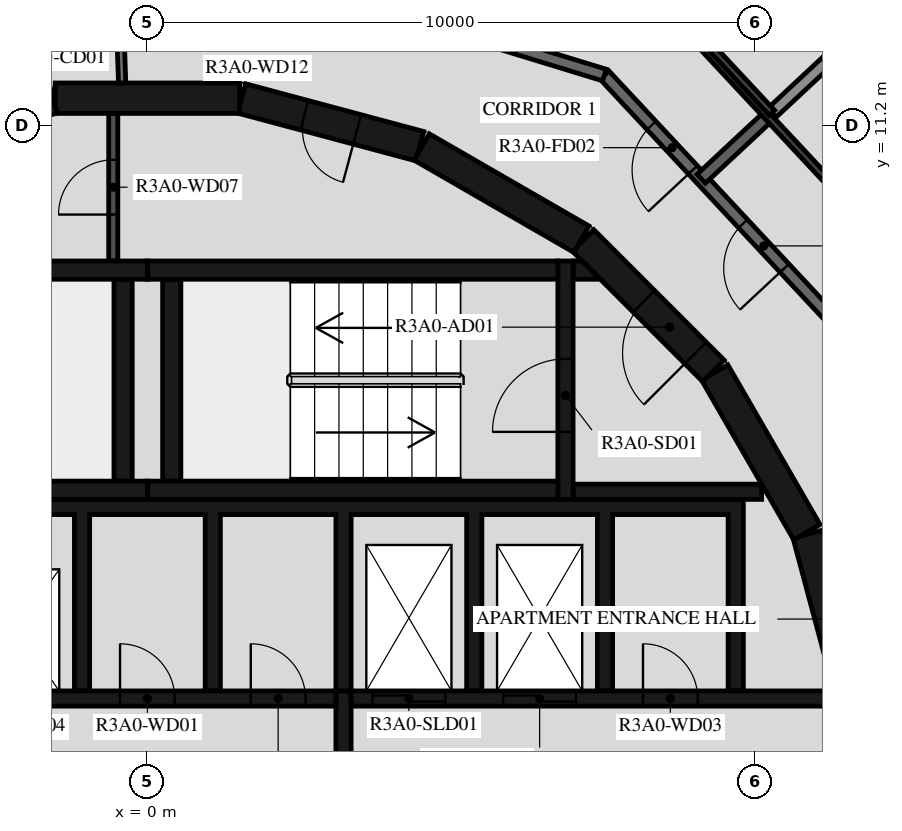
"""IFC4 building model, lengths in metres.
Left out: names, types, materials, properties, quantities, classifications, styles, units other than length and angle.
Written with IfcOpenShell. Run it as: python <this file> out.ifc"""

import sys

from ifc_helpers import new_model, si_unit, direction, frame, frame_2d, origin, place, context, subcontext, project, spatial, polyline, rectangle, outline, extrude, element, fill, save


model = new_model("IFC4")
c1 = context("Model", 3, precision=1e-05, world=origin(), true_north=direction((0.0, 1.0)))
c2 = subcontext(c1, "Body", "Model", "MODEL_VIEW")
j1 = project(units=[si_unit("LENGTHUNIT", "METRE"), si_unit("PLANEANGLEUNIT", "RADIAN")], contexts=[c1])
p1 = place(None, origin())
s1 = spatial("IfcSite", under=j1, at=p1, CompositionType="ELEMENT")
p2 = place(p1, origin())
s2 = spatial("IfcBuilding", under=s1, at=p2, CompositionType="ELEMENT")
p3 = place(p2, frame((0.0, 0.0, 113.4)))
s3 = spatial("IfcBuildingStorey", under=s2, at=p3, CompositionType="ELEMENT", Elevation=113.4)
p4 = place(p3, frame((5.146, 28.027, 0.03), z_axis=(0.0, 0.0, 1.0), x_axis=(0.595048436217, -0.803689839774, 0.0)))
e1 = element("IfcWall", 1, at=p4, inside=s3, PredefinedType="PARAPET", context=c2, shape_type="SweptSolid", body=[
    extrude(rectangle(XDim=35.306, YDim=0.2, at=frame_2d((17.653, 0.0))), origin(), (0.0, 0.0, 1.0), 1.5),
])
for number, where, z_axis, x_axis in (
    (2, (11.643, 1.55, 0.0), (0.0, 0.0, 1.0), (-0.259, 0.966, 0.0)),
    (3, (10.845, 4.51, 0.0), (0.0, 0.0, 1.0), (-0.5, 0.866, 0.0)),
):
    element("IfcWall", number, at=place(p3, frame(where, z_axis=z_axis, x_axis=x_axis)), inside=s3, PredefinedType="SHEAR", context=c2, shape_type="SweptSolid", body=[
        extrude(rectangle(XDim=3.033, YDim=0.5, at=frame_2d((1.516, 0.0))), origin(), (0.0, 0.0, 1.0), 3.12),
    ])
p5 = place(p3, frame((9.308, 7.164, 0.0), z_axis=(0.0, 0.0, 1.0), x_axis=(-0.707106781187, 0.707106781187, 0.0)))
e4 = element("IfcWall", 4, at=p5, inside=s3, PredefinedType="SHEAR", context=c2, shape_type="SweptSolid", body=[
    extrude(rectangle(XDim=3.032, YDim=0.5, at=frame_2d((1.516, 0.0))), origin(), (0.0, 0.0, 1.0), 3.12),
])
p6 = place(p5, frame((0.416, 0.0, 0.0)))
e5 = element("IfcOpeningElement", 5, at=p6, cuts=e4, PredefinedType="OPENING", context=c2, shape_type="SweptSolid", body=[
    extrude(rectangle(XDim=1.2, YDim=2.1, at=frame_2d((0.6, 1.05))), frame((0.0, 0.26, 0.0), z_axis=(0.0, -1.0, 0.0), x_axis=(1.0, 0.0, 0.0)), (0.0, 0.0, 1.0), 0.52),
])
p7 = place(p3, frame((7.137, 9.329, 0.0), z_axis=(0.0, 0.0, 1.0), x_axis=(-0.865975092491, 0.500087131594, 0.0)))
e6 = element("IfcWall", 6, at=p7, inside=s3, PredefinedType="SHEAR", context=c2, shape_type="SweptSolid", body=[
    extrude(rectangle(XDim=3.033, YDim=0.5, at=frame_2d((1.516, 0.0))), origin(), (0.0, 0.0, 1.0), 3.12),
])
p8 = place(p3, frame((4.479, 10.858, 0.0), z_axis=(0.0, 0.0, 1.0), x_axis=(-0.965948410781, 0.258734743916, 0.0)))
e7 = element("IfcWall", 7, at=p8, inside=s3, PredefinedType="SHEAR", context=c2, shape_type="SweptSolid", body=[
    extrude(rectangle(XDim=3.033, YDim=0.5, at=frame_2d((1.516, 0.0))), origin(), (0.0, 0.0, 1.0), 3.12),
])
p9 = place(p8, frame((1.066, 0.0, 0.0)))
e8 = element("IfcOpeningElement", 8, at=p9, cuts=e7, PredefinedType="OPENING", context=c2, shape_type="SweptSolid", body=[
    extrude(rectangle(XDim=0.9, YDim=2.1, at=frame_2d((0.45, 1.05))), frame((0.0, 0.26, 0.0), z_axis=(0.0, -1.0, 0.0), x_axis=(1.0, 0.0, 0.0)), (0.0, 0.0, 1.0), 0.52),
])
for number, where, z_axis, x_axis in (
    (9, (1.516, 11.647, 0.0), (0.0, 0.0, 1.0), (-1.0, 0.0, 0.0)),
    (10, (-1.55, 11.643, 0.0), (0.0, 0.0, 1.0), (-0.966, -0.259, 0.0)),
):
    element("IfcWall", number, at=place(p3, frame(where, z_axis=z_axis, x_axis=x_axis)), inside=s3, PredefinedType="SHEAR", context=c2, shape_type="SweptSolid", body=[
        extrude(rectangle(XDim=3.033, YDim=0.5, at=frame_2d((1.516, 0.0))), origin(), (0.0, 0.0, 1.0), 3.12),
    ])
for number, where, z_axis, x_axis in (
    (11, (0.0, 5.2, 0.0), (0.0, 0.0, 1.0), (1.0, 0.0, 0.0)),
    (12, (0.0, 8.82, 0.0), (0.0, 0.0, 1.0), (1.0, 0.0, 0.0)),
):
    element("IfcWall", number, at=place(p3, frame(where, z_axis=z_axis, x_axis=x_axis)), inside=s3, PredefinedType="SHEAR", context=c2, shape_type="SweptSolid", body=[
        extrude(rectangle(XDim=6.75, YDim=0.3, at=frame_2d((3.375, 0.0))), origin(), (0.0, 0.0, 1.0), 3.12),
    ])
p10 = place(p3, frame((0.4, 5.35, 0.0), z_axis=(0.0, 0.0, 1.0), x_axis=(0.0, 1.0, 0.0)))
e13 = element("IfcWall", 13, at=p10, inside=s3, PredefinedType="SHEAR", context=c2, shape_type="SweptSolid", body=[
    extrude(rectangle(XDim=3.32, YDim=0.3, at=frame_2d((1.66, 0.0))), origin(), (0.0, 0.0, 1.0), 3.12),
])
p11 = place(p3, frame((6.875, 5.05, 0.0), z_axis=(0.0, 0.0, 1.0), x_axis=(0.0, 1.0, 0.0)))
e14 = element("IfcWall", 14, at=p11, inside=s3, PredefinedType="SHEAR", context=c2, shape_type="SweptSolid", body=[
    extrude(rectangle(XDim=3.92, YDim=0.25, at=frame_2d((1.96, 0.0))), origin(), (0.0, 0.0, 1.0), 3.12),
])
p12 = place(p11, frame((1.11, 0.0, 0.0)))
e15 = element("IfcOpeningElement", 15, at=p12, cuts=e14, PredefinedType="OPENING", context=c2, shape_type="SweptSolid", body=[
    extrude(rectangle(XDim=1.2, YDim=2.1, at=frame_2d((0.6, 1.05))), frame((0.0, 0.135, 0.0), z_axis=(0.0, -1.0, 0.0), x_axis=(1.0, 0.0, 0.0)), (0.0, 0.0, 1.0), 0.27),
])
p13 = place(p3, frame((7.0, 5.175, 0.0), z_axis=(0.0, 0.0, 1.0), x_axis=(1.0, 0.0, 0.0)))
e16 = element("IfcWall", 16, at=p13, inside=s3, PredefinedType="SHEAR", context=c2, shape_type="SweptSolid", body=[
    extrude(rectangle(XDim=3.1, YDim=0.25, at=frame_2d((1.55, 0.0))), origin(), (0.0, 0.0, 1.0), 3.12),
])
p14 = place(p3, origin())
e17 = element("IfcWall", 17, at=p14, inside=s3, PredefinedType="SHEAR", context=c2, shape_type="SweptSolid", body=[
    extrude(outline(polyline([(7.448, 8.67), (7.0, 8.67), (7.0, 8.97), (7.148, 8.97), (7.448, 8.67)])), origin(), (0.0, 0.0, 1.0), 3.12),
])
for number, where, z_axis, x_axis in (
    (18, (-6.75, 5.2, 0.0), (0.0, 0.0, 1.0), (1.0, 0.0, 0.0)),
    (19, (-6.75, 8.82, 0.0), (0.0, 0.0, 1.0), (1.0, 0.0, 0.0)),
):
    element("IfcWall", number, at=place(p3, frame(where, z_axis=z_axis, x_axis=x_axis)), inside=s3, PredefinedType="SHEAR", context=c2, shape_type="SweptSolid", body=[
        extrude(rectangle(XDim=6.75, YDim=0.3, at=frame_2d((3.375, 0.0))), origin(), (0.0, 0.0, 1.0), 3.12),
    ])
p15 = place(p3, frame((-0.4, 5.35, 0.0), z_axis=(0.0, 0.0, 1.0), x_axis=(0.0, 1.0, 0.0)))
e20 = element("IfcWall", 20, at=p15, inside=s3, PredefinedType="SHEAR", context=c2, shape_type="SweptSolid", body=[
    extrude(rectangle(XDim=3.32, YDim=0.3, at=frame_2d((1.66, 0.0))), origin(), (0.0, 0.0, 1.0), 3.12),
])
p16 = place(p3, origin())
e21 = element("IfcWall", 21, at=p16, inside=s3, PredefinedType="SHEAR", context=c2, shape_type="SweptSolid", body=[
    extrude(outline(polyline([(-9.55, 4.8), (-7.65, 4.8), (-7.65, 1.9), (-7.4, 1.9), (-7.4, 4.8), (-5.5, 4.8), (-5.5, 1.9), (-5.25, 1.9), (-5.25, 4.8), (-3.35, 4.8), (-3.35, 1.9), (-3.1, 1.9), (-3.1, 4.8), (-1.2, 4.8), (-1.2, 1.9), (-0.95, 1.9), (-0.95, 4.8), (0.95, 4.8), (0.95, 1.9), (1.2, 1.9), (1.2, 4.8), (3.1, 4.8), (3.1, 1.9), (3.35, 1.9), (3.35, 4.8), (5.25, 4.8), (5.25, 1.9), (5.5, 1.9), (5.5, 4.8), (7.4, 4.8), (7.4, 1.9), (7.65, 1.9), (7.65, 4.8), (9.55, 4.8), (9.55, 1.9), (9.8, 1.9), (9.8, 4.8), (9.8, 5.05), (-9.8, 5.05), (-9.8, 4.8), (-9.8, 1.9), (-9.55, 1.9), (-9.55, 4.8)])), origin(), (0.0, 0.0, 1.0), 3.12),
])
p17 = place(p3, frame((-11.28, 1.775, 0.0), z_axis=(0.0, 0.0, 1.0), x_axis=(1.0, 0.0, 0.0)))
e22 = element("IfcWall", 22, at=p17, inside=s3, PredefinedType="SHEAR", context=c2, shape_type="SweptSolid", body=[
    extrude(rectangle(XDim=14.38, YDim=0.25, at=frame_2d((7.19, 0.0))), origin(), (0.0, 0.0, 1.0), 3.12),
])
p18 = place(p17, frame((2.13, 0.0, 0.0)))
e23 = element("IfcOpeningElement", 23, at=p18, cuts=e22, PredefinedType="OPENING", context=c2, shape_type="SweptSolid", body=[
    extrude(rectangle(XDim=1.1, YDim=2.1, at=frame_2d((0.55, 1.05))), frame((0.0, 0.135, 0.0), z_axis=(0.0, -1.0, 0.0), x_axis=(1.0, 0.0, 0.0)), (0.0, 0.0, 1.0), 0.27),
])
p19 = place(p17, frame((4.28, 0.0, 0.0)))
e24 = element("IfcOpeningElement", 24, at=p19, cuts=e22, PredefinedType="OPENING", context=c2, shape_type="SweptSolid", body=[
    extrude(rectangle(XDim=1.1, YDim=2.1, at=frame_2d((0.55, 1.05))), frame((0.0, 0.135, 0.0), z_axis=(0.0, -1.0, 0.0), x_axis=(1.0, 0.0, 0.0)), (0.0, 0.0, 1.0), 0.27),
])
p20 = place(p17, frame((6.43, 0.0, 0.0)))
e25 = element("IfcOpeningElement", 25, at=p20, cuts=e22, PredefinedType="OPENING", context=c2, shape_type="SweptSolid", body=[
    extrude(rectangle(XDim=1.1, YDim=2.1, at=frame_2d((0.55, 1.05))), frame((0.0, 0.135, 0.0), z_axis=(0.0, -1.0, 0.0), x_axis=(1.0, 0.0, 0.0)), (0.0, 0.0, 1.0), 0.27),
])
p21 = place(p17, frame((8.58, 0.0, 0.0)))
e26 = element("IfcOpeningElement", 26, at=p21, cuts=e22, PredefinedType="OPENING", context=c2, shape_type="SweptSolid", body=[
    extrude(rectangle(XDim=1.1, YDim=2.1, at=frame_2d((0.55, 1.05))), frame((0.0, 0.135, 0.0), z_axis=(0.0, -1.0, 0.0), x_axis=(1.0, 0.0, 0.0)), (0.0, 0.0, 1.0), 0.27),
])
p22 = place(p17, frame((10.83, 0.0, 0.0)))
e27 = element("IfcOpeningElement", 27, at=p22, cuts=e22, PredefinedType="OPENING", context=c2, shape_type="SweptSolid", body=[
    extrude(rectangle(XDim=0.9, YDim=2.1, at=frame_2d((0.45, 1.05))), frame((0.0, 0.135, 0.0), z_axis=(0.0, -1.0, 0.0), x_axis=(1.0, 0.0, 0.0)), (0.0, 0.0, 1.0), 0.27),
])
p23 = place(p17, frame((12.98, 0.0, 0.0)))
e28 = element("IfcOpeningElement", 28, at=p23, cuts=e22, PredefinedType="OPENING", context=c2, shape_type="SweptSolid", body=[
    extrude(rectangle(XDim=0.9, YDim=2.1, at=frame_2d((0.45, 1.05))), frame((0.0, 0.135, 0.0), z_axis=(0.0, -1.0, 0.0), x_axis=(1.0, 0.0, 0.0)), (0.0, 0.0, 1.0), 0.27),
])
p24 = place(p3, frame((3.35, 1.775, 0.0), z_axis=(0.0, 0.0, 1.0), x_axis=(1.0, 0.0, 0.0)))
e29 = element("IfcWall", 29, at=p24, inside=s3, PredefinedType="SHEAR", context=c2, shape_type="SweptSolid", body=[
    extrude(rectangle(XDim=7.93, YDim=0.25, at=frame_2d((3.965, 0.0))), origin(), (0.0, 0.0, 1.0), 3.12),
])
p25 = place(p24, frame((0.35, 0.0, 0.0)))
e30 = element("IfcOpeningElement", 30, at=p25, cuts=e29, PredefinedType="OPENING", context=c2, shape_type="SweptSolid", body=[
    extrude(rectangle(XDim=1.2, YDim=2.4, at=frame_2d((0.6, 1.2))), frame((0.0, 0.135, 0.0), z_axis=(0.0, -1.0, 0.0), x_axis=(1.0, 0.0, 0.0)), (0.0, 0.0, 1.0), 0.27),
])
p26 = place(p24, frame((2.5, 0.0, 0.0)))
e31 = element("IfcOpeningElement", 31, at=p26, cuts=e29, PredefinedType="OPENING", context=c2, shape_type="SweptSolid", body=[
    extrude(rectangle(XDim=1.2, YDim=2.4, at=frame_2d((0.6, 1.2))), frame((0.0, 0.135, 0.0), z_axis=(0.0, -1.0, 0.0), x_axis=(1.0, 0.0, 0.0)), (0.0, 0.0, 1.0), 0.27),
])
p27 = place(p24, frame((4.8, 0.0, 0.0)))
e32 = element("IfcOpeningElement", 32, at=p27, cuts=e29, PredefinedType="OPENING", context=c2, shape_type="SweptSolid", body=[
    extrude(rectangle(XDim=0.9, YDim=2.1, at=frame_2d((0.45, 1.05))), frame((0.0, 0.135, 0.0), z_axis=(0.0, -1.0, 0.0), x_axis=(1.0, 0.0, 0.0)), (0.0, 0.0, 1.0), 0.27),
])
p28 = place(p3, frame((3.225, -1.9, 0.0), z_axis=(0.0, 0.0, 1.0), x_axis=(0.0, 1.0, 0.0)))
e33 = element("IfcWall", 33, at=p28, inside=s3, PredefinedType="SHEAR", context=c2, shape_type="SweptSolid", body=[
    extrude(rectangle(XDim=3.8, YDim=0.25, at=frame_2d((1.9, 0.0))), origin(), (0.0, 0.0, 1.0), 3.12),
])
p29 = place(p3, frame((-0.562, 8.97, 0.0), z_axis=(0.0, 0.0, 1.0), x_axis=(0.0, 1.0, 0.0)))
e34 = element("IfcWall", 34, at=p29, inside=s3, PredefinedType="PARTITIONING", context=c2, shape_type="SweptSolid", body=[
    extrude(rectangle(XDim=2.427, YDim=0.15, at=frame_2d((1.214, 0.0))), origin(), (0.0, 0.0, 1.0), 3.12),
])
p30 = place(p29, frame((0.764, 0.0, 0.0)))
e35 = element("IfcOpeningElement", 35, at=p30, cuts=e34, PredefinedType="OPENING", context=c2, shape_type="SweptSolid", body=[
    extrude(rectangle(XDim=0.9, YDim=2.1, at=frame_2d((0.45, 1.05))), frame((0.0, 0.085, 0.0), z_axis=(0.0, -1.0, 0.0), x_axis=(1.0, 0.0, 0.0)), (0.0, 0.0, 1.0), 0.17),
])
p31 = place(p3, frame((-0.487, 13.948, 0.0), z_axis=(0.0, 0.0, 1.0), x_axis=(0.034859752231, -0.999392214135, 0.0)))
e36 = element("IfcWall", 36, at=p31, inside=s3, PredefinedType="PARTITIONING", context=c2, shape_type="SweptSolid", body=[
    extrude(rectangle(XDim=2.052, YDim=0.12, at=frame_2d((1.026, 0.0))), origin(), (0.0, 0.0, 1.0), 3.12),
])
p32 = place(p31, frame((0.125, 0.0, 0.0)))
e37 = element("IfcOpeningElement", 37, at=p32, cuts=e36, PredefinedType="OPENING", context=c2, shape_type="SweptSolid", body=[
    extrude(rectangle(XDim=1.2, YDim=2.1, at=frame_2d((0.6, 1.05))), frame((0.0, 0.07, 0.0), z_axis=(0.0, -1.0, 0.0), x_axis=(1.0, 0.0, 0.0)), (0.0, 0.0, 1.0), 0.14),
])
p33 = place(p3, frame((12.523, 6.659, 0.0), z_axis=(0.0, 0.0, 1.0), x_axis=(-0.682001841105, 0.731350455479, 0.0)))
e38 = element("IfcWall", 38, at=p33, inside=s3, PredefinedType="STANDARD", context=c2, shape_type="SweptSolid", body=[
    extrude(rectangle(XDim=7.342, YDim=0.2, at=frame_2d((3.671, 0.0))), origin(), (0.0, 0.0, 1.0), 3.12),
])
p34 = place(p33, frame((3.0, 0.0, 0.0)))
e39 = element("IfcOpeningElement", 39, at=p34, cuts=e38, PredefinedType="OPENING", context=c2, shape_type="SweptSolid", body=[
    extrude(rectangle(XDim=1.0, YDim=2.1, at=frame_2d((0.5, 1.05))), frame((0.0, 0.11, 0.0), z_axis=(0.0, -1.0, 0.0), x_axis=(1.0, 0.0, 0.0)), (0.0, 0.0, 1.0), 0.22),
])
p35 = place(p33, frame((5.209, 0.0, 0.0)))
e40 = element("IfcOpeningElement", 40, at=p35, cuts=e38, PredefinedType="OPENING", context=c2, shape_type="SweptSolid", body=[
    extrude(rectangle(XDim=1.0, YDim=2.1, at=frame_2d((0.5, 1.05))), frame((0.0, 0.11, 0.0), z_axis=(0.0, -1.0, 0.0), x_axis=(1.0, 0.0, 0.0)), (0.0, 0.0, 1.0), 0.22),
])
p36 = place(p3, frame((7.516, 12.028, 0.0), z_axis=(0.0, 0.0, 1.0), x_axis=(-0.956306642771, 0.292365533182, 0.0)))
e41 = element("IfcWall", 41, at=p36, inside=s3, PredefinedType="STANDARD", context=c2, shape_type="SweptSolid", body=[
    extrude(rectangle(XDim=7.342, YDim=0.2, at=frame_2d((3.671, 0.0))), origin(), (0.0, 0.0, 1.0), 3.12),
])
p37 = place(p3, frame((10.233, 11.372, 0.0), z_axis=(0.0, 0.0, 1.0), x_axis=(-0.731329353292, -0.682024469513, 0.0)))
e42 = element("IfcWall", 42, at=p37, inside=s3, PredefinedType="STANDARD", context=c2, shape_type="SweptSolid", body=[
    extrude(rectangle(XDim=1.54, YDim=0.2, at=frame_2d((0.77, 0.0))), origin(), (0.0, 0.0, 1.0), 3.12),
])
p38 = place(p3, frame((12.903, 13.862, 0.0), z_axis=(0.0, 0.0, 1.0), x_axis=(-0.731328084739, -0.682025829769, 0.0)))
e43 = element("IfcWall", 43, at=p38, inside=s3, PredefinedType="STANDARD", context=c2, shape_type="SweptSolid", body=[
    extrude(rectangle(XDim=3.6, YDim=0.2, at=frame_2d((1.8, 0.0))), origin(), (0.0, 0.0, 1.0), 2.73),
])
p39 = place(p3, frame((13.894, 7.388, 0.0), z_axis=(0.0, 0.0, 1.0), x_axis=(-0.681994622729, 0.731357186721, 0.0)))
e44 = element("IfcWall", 44, at=p39, inside=s3, PredefinedType="PARTITIONING", context=c2, shape_type="SweptSolid", body=[
    extrude(rectangle(XDim=8.146, YDim=0.12, at=frame_2d((4.073, 0.0))), origin(), (0.0, 0.0, 1.0), 3.12),
])
p40 = place(p39, frame((0.2, 0.0, 0.0)))
e45 = element("IfcOpeningElement", 45, at=p40, cuts=e44, PredefinedType="OPENING", context=c2, shape_type="SweptSolid", body=[
    extrude(rectangle(XDim=0.9, YDim=2.1, at=frame_2d((0.45, 1.05))), frame((0.0, 0.07, 0.0), z_axis=(0.0, -1.0, 0.0), x_axis=(1.0, 0.0, 0.0)), (0.0, 0.0, 1.0), 0.14),
])
p41 = place(p3, frame((-1.539, 24.071, 0.0), z_axis=(0.0, 0.0, 1.0), x_axis=(0.68200220595, -0.731350115252, 0.0)))
e46 = element("IfcWall", 46, at=p41, inside=s3, PredefinedType="PARTITIONING", context=c2, shape_type="SweptSolid", body=[
    extrude(rectangle(XDim=17.316, YDim=0.12, at=frame_2d((8.658, 0.0))), origin(), (0.0, 0.0, 1.0), 3.12),
])
p42 = place(p41, frame((3.323, 0.0, 0.0)))
e47 = element("IfcOpeningElement", 47, at=p42, cuts=e46, PredefinedType="OPENING", context=c2, shape_type="SweptSolid", body=[
    extrude(rectangle(XDim=0.9, YDim=2.1, at=frame_2d((0.45, 1.05))), frame((0.0, 0.07, 0.0), z_axis=(0.0, -1.0, 0.0), x_axis=(1.0, 0.0, 0.0)), (0.0, 0.0, 1.0), 0.14),
])
p43 = place(p41, frame((1.417, 0.0, 0.0)))
e48 = element("IfcOpeningElement", 48, at=p43, cuts=e46, PredefinedType="OPENING", context=c2, shape_type="SweptSolid", body=[
    extrude(rectangle(XDim=0.9, YDim=2.1, at=frame_2d((0.45, 1.05))), frame((0.0, 0.07, 0.0), z_axis=(0.0, -1.0, 0.0), x_axis=(1.0, 0.0, 0.0)), (0.0, 0.0, 1.0), 0.14),
])
p44 = place(p12, origin())
e49 = element("IfcDoor", 49, at=p44, inside=s3, OperationType="SINGLE_SWING_LEFT", PredefinedType="DOOR", context=c2, shape_type="SweptSolid", body=[
    extrude(rectangle(XDim=1.2, YDim=2.1, at=frame_2d((0.6, 1.05))), frame((0.0, 0.025, 0.0), z_axis=(0.0, -1.0, 0.0), x_axis=(1.0, 0.0, 0.0)), (0.0, 0.0, 1.0), 0.05),
])
fill(e15, e49)
p45 = place(p6, origin())
e50 = element("IfcDoor", 50, at=p45, inside=s3, OperationType="SINGLE_SWING_RIGHT", PredefinedType="DOOR", context=c2, shape_type="SweptSolid", body=[
    extrude(rectangle(XDim=1.2, YDim=2.1, at=frame_2d((0.6, 1.05))), frame((0.0, 0.025, 0.0), z_axis=(0.0, -1.0, 0.0), x_axis=(1.0, 0.0, 0.0)), (0.0, 0.0, 1.0), 0.05),
])
fill(e5, e50)
p46 = place(p25, origin())
e51 = element("IfcDoor", 51, at=p46, inside=s3, OperationType="DOUBLE_DOOR_SLIDING", PredefinedType="DOOR", context=c2, shape_type="SweptSolid", body=[
    extrude(rectangle(XDim=1.2, YDim=2.4, at=frame_2d((0.6, 1.2))), frame((0.0, 0.025, 0.0), z_axis=(0.0, -1.0, 0.0), x_axis=(1.0, 0.0, 0.0)), (0.0, 0.0, 1.0), 0.05),
])
fill(e30, e51)
p47 = place(p26, origin())
e52 = element("IfcDoor", 52, at=p47, inside=s3, OperationType="DOUBLE_DOOR_SLIDING", PredefinedType="DOOR", context=c2, shape_type="SweptSolid", body=[
    extrude(rectangle(XDim=1.2, YDim=2.4, at=frame_2d((0.6, 1.2))), frame((0.0, 0.025, 0.0), z_axis=(0.0, -1.0, 0.0), x_axis=(1.0, 0.0, 0.0)), (0.0, 0.0, 1.0), 0.05),
])
fill(e31, e52)
p48 = place(p22, origin())
e53 = element("IfcDoor", 53, at=p48, inside=s3, OperationType="SINGLE_SWING_RIGHT", PredefinedType="DOOR", context=c2, shape_type="SweptSolid", body=[
    extrude(rectangle(XDim=0.9, YDim=2.1, at=frame_2d((0.45, 1.05))), frame((0.0, 0.025, 0.0), z_axis=(0.0, -1.0, 0.0), x_axis=(1.0, 0.0, 0.0)), (0.0, 0.0, 1.0), 0.05),
])
fill(e27, e53)
p49 = place(p23, origin())
e54 = element("IfcDoor", 54, at=p49, inside=s3, OperationType="SINGLE_SWING_LEFT", PredefinedType="DOOR", context=c2, shape_type="SweptSolid", body=[
    extrude(rectangle(XDim=0.9, YDim=2.1, at=frame_2d((0.45, 1.05))), frame((0.0, 0.025, 0.0), z_axis=(0.0, -1.0, 0.0), x_axis=(1.0, 0.0, 0.0)), (0.0, 0.0, 1.0), 0.05),
])
fill(e28, e54)
p50 = place(p27, origin())
e55 = element("IfcDoor", 55, at=p50, inside=s3, OperationType="SINGLE_SWING_RIGHT", PredefinedType="DOOR", context=c2, shape_type="SweptSolid", body=[
    extrude(rectangle(XDim=0.9, YDim=2.1, at=frame_2d((0.45, 1.05))), frame((0.0, 0.025, 0.0), z_axis=(0.0, -1.0, 0.0), x_axis=(1.0, 0.0, 0.0)), (0.0, 0.0, 1.0), 0.05),
])
fill(e32, e55)
p51 = place(p30, origin())
e56 = element("IfcDoor", 56, at=p51, inside=s3, OperationType="SINGLE_SWING_RIGHT", PredefinedType="DOOR", context=c2, shape_type="SweptSolid", body=[
    extrude(rectangle(XDim=0.9, YDim=2.1, at=frame_2d((0.45, 1.05))), frame((0.0, 0.025, 0.0), z_axis=(0.0, -1.0, 0.0), x_axis=(1.0, 0.0, 0.0)), (0.0, 0.0, 1.0), 0.05),
])
fill(e35, e56)
p52 = place(p9, origin())
e57 = element("IfcDoor", 57, at=p52, inside=s3, OperationType="SINGLE_SWING_LEFT", PredefinedType="DOOR", context=c2, shape_type="SweptSolid", body=[
    extrude(rectangle(XDim=0.9, YDim=2.1, at=frame_2d((0.45, 1.05))), frame((0.0, 0.025, 0.0), z_axis=(0.0, -1.0, 0.0), x_axis=(1.0, 0.0, 0.0)), (0.0, 0.0, 1.0), 0.05),
])
fill(e8, e57)
p53 = place(p34, origin())
e58 = element("IfcDoor", 58, at=p53, inside=s3, OperationType="SINGLE_SWING_LEFT", PredefinedType="DOOR", context=c2, shape_type="SweptSolid", body=[
    extrude(rectangle(XDim=1.0, YDim=2.1, at=frame_2d((0.5, 1.05))), frame((0.0, 0.025, 0.0), z_axis=(0.0, -1.0, 0.0), x_axis=(1.0, 0.0, 0.0)), (0.0, 0.0, 1.0), 0.05),
])
fill(e39, e58)
p54 = place(p35, origin())
e59 = element("IfcDoor", 59, at=p54, inside=s3, OperationType="SINGLE_SWING_RIGHT", PredefinedType="DOOR", context=c2, shape_type="SweptSolid", body=[
    extrude(rectangle(XDim=1.0, YDim=2.1, at=frame_2d((0.5, 1.05))), frame((0.0, 0.025, 0.0), z_axis=(0.0, -1.0, 0.0), x_axis=(1.0, 0.0, 0.0)), (0.0, 0.0, 1.0), 0.05),
])
fill(e40, e59)
save(model, sys.argv[1])
